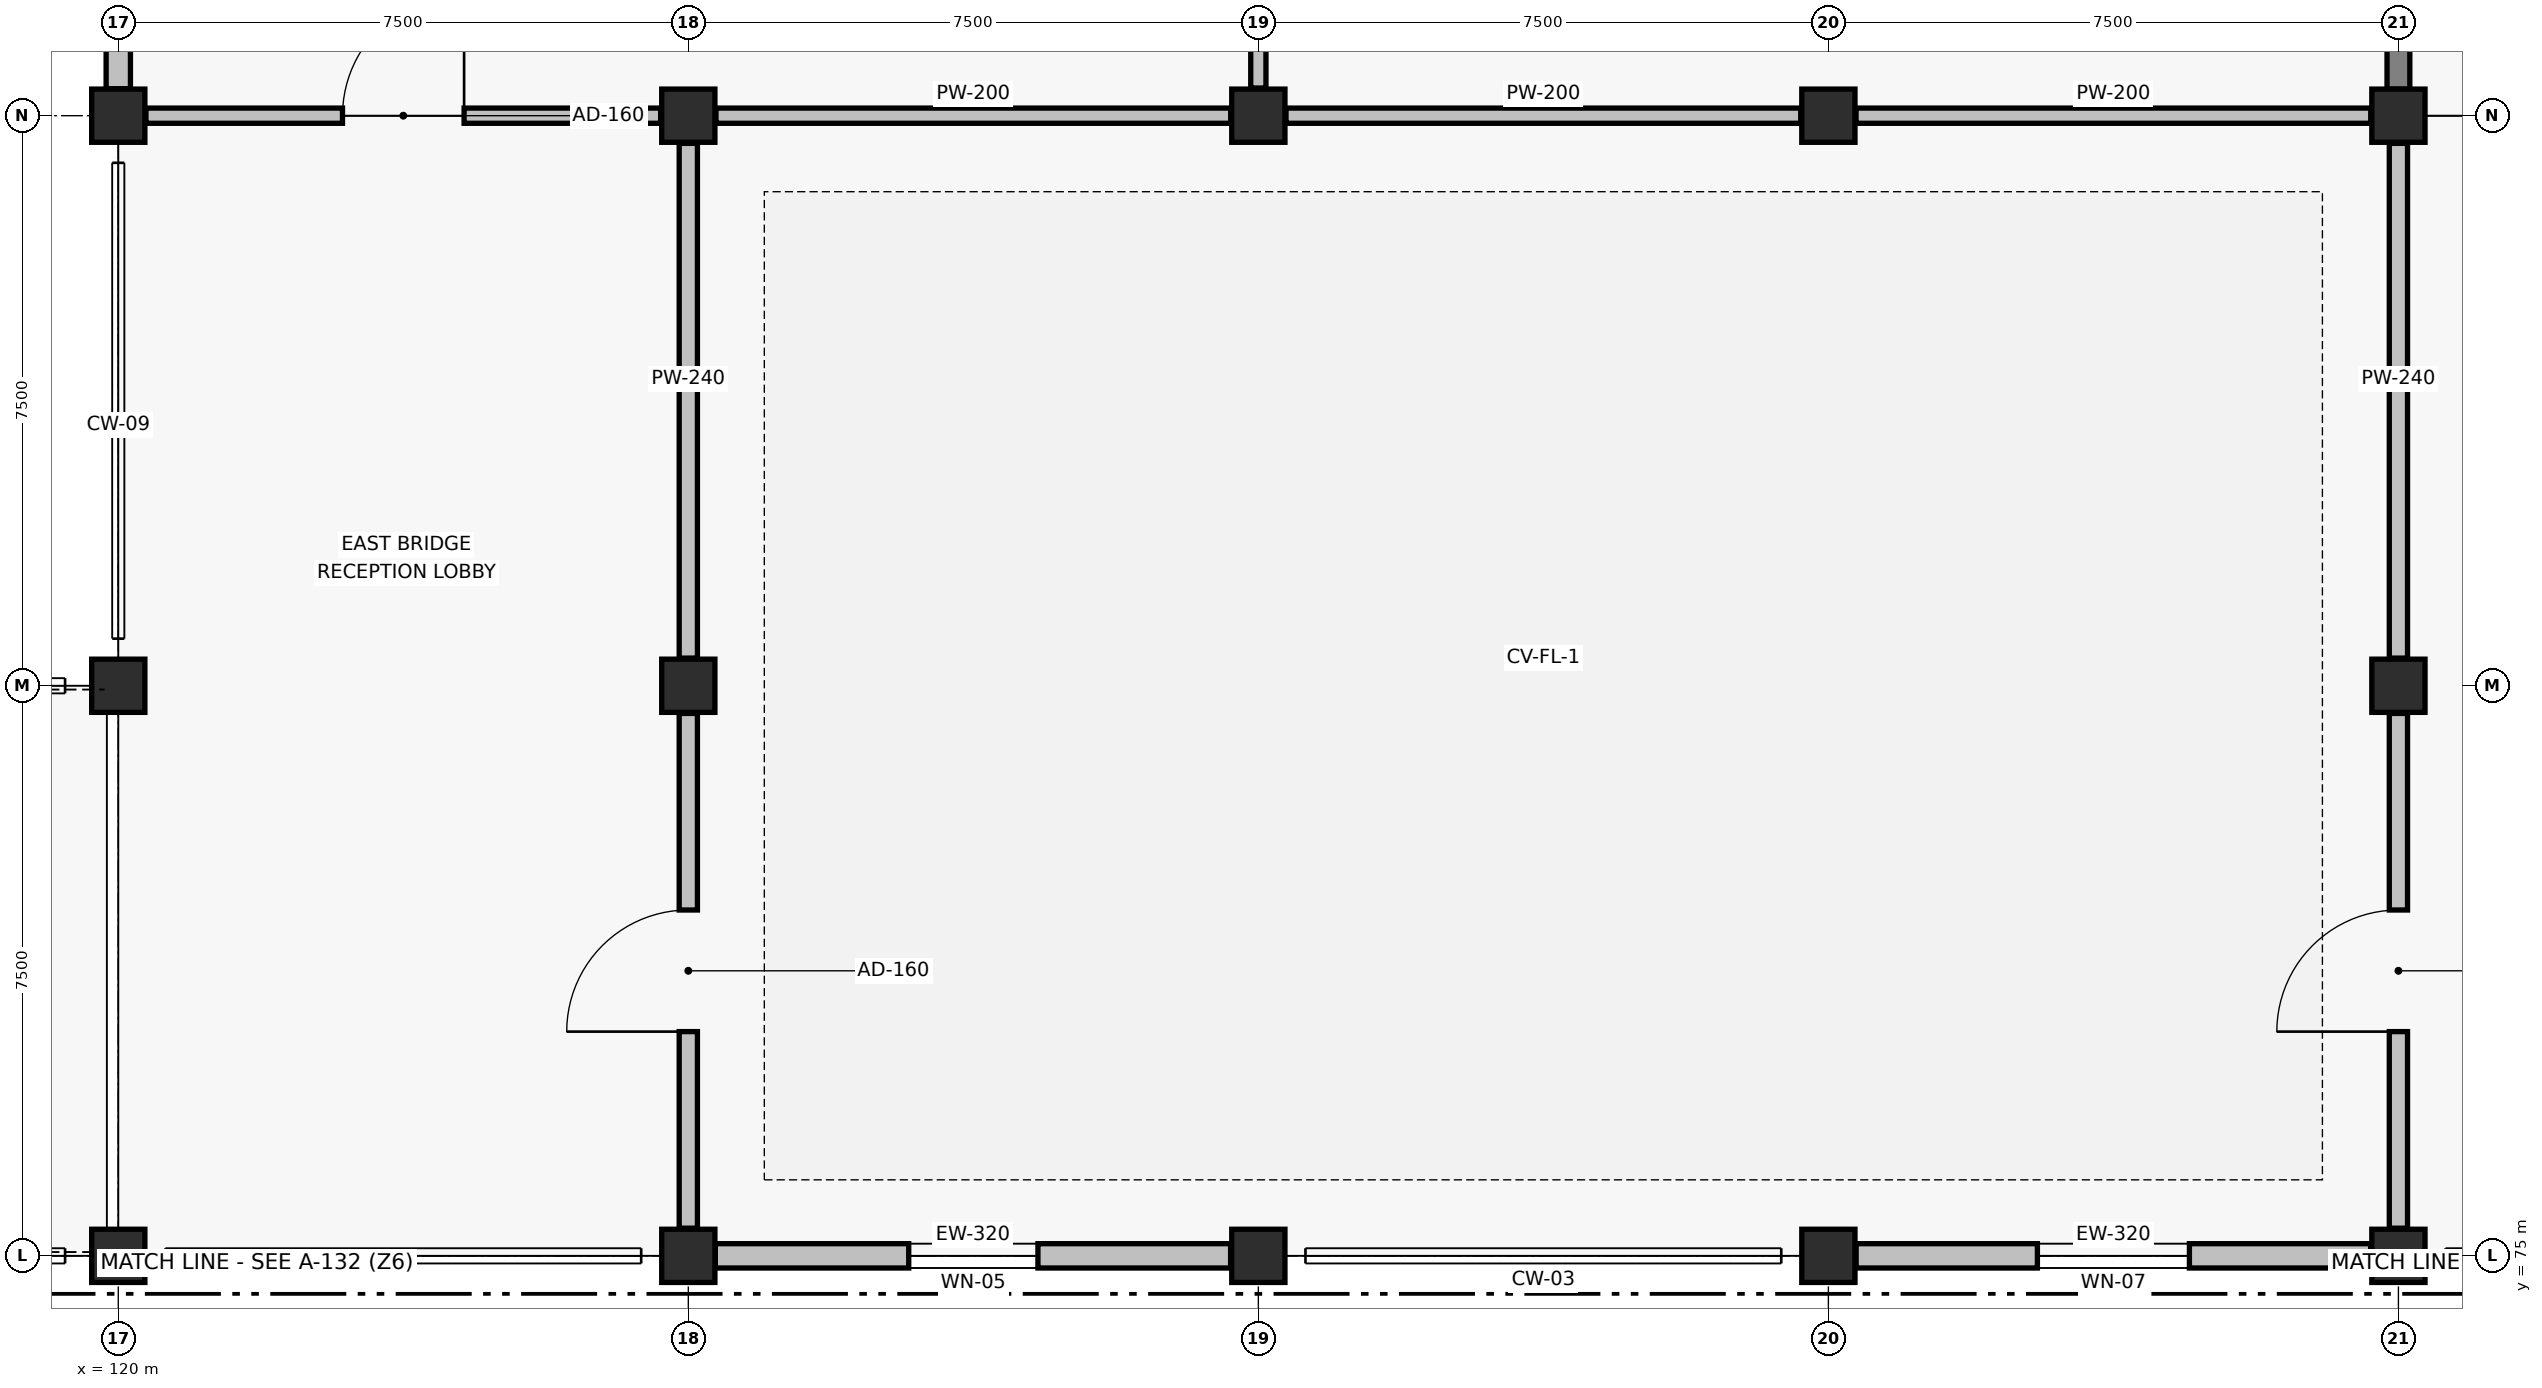
"""IFC4 building model, lengths in metres.
Left out: names, types, materials, properties, quantities, classifications, styles, units other than length and angle.
Written with IfcOpenShell. Run it as: python <this file> out.ifc"""

import sys

from ifc_helpers import new_model, si_unit, direction, frame, frame_2d, origin, origin_2d, place, context, subcontext, project, spatial, rectangle, extrude, element, fill, save


model = new_model("IFC4")
c1 = context("Model", 3, precision=1e-05, world=origin(), true_north=direction((0.0, 1.0)))
c2 = subcontext(c1, "Body", "Model", "MODEL_VIEW")
j1 = project(units=[si_unit("LENGTHUNIT", "METRE"), si_unit("PLANEANGLEUNIT", "RADIAN")], contexts=[c1])
p1 = place(None, origin())
s1 = spatial("IfcSite", under=j1, at=p1, CompositionType="ELEMENT")
p2 = place(p1, origin())
s2 = spatial("IfcBuilding", under=s1, at=p2, CompositionType="ELEMENT")
p3 = place(p2, frame((0.0, 0.0, 4.8)))
s3 = spatial("IfcBuildingStorey", under=s2, at=p3, CompositionType="ELEMENT", Elevation=4.8)
for number, where, z_axis, x_axis in (
    (1, (120.0, 75.0, 0.0), (0.0, 0.0, 1.0), (1.0, 0.0, 0.0)),
    (2, (120.0, 82.5, 0.0), (0.0, 0.0, 1.0), (1.0, 0.0, 0.0)),
    (3, (120.0, 90.0, 0.0), (0.0, 0.0, 1.0), (1.0, 0.0, 0.0)),
    (4, (127.5, 75.0, 0.0), (0.0, 0.0, 1.0), (1.0, 0.0, 0.0)),
    (5, (127.5, 82.5, 0.0), (0.0, 0.0, 1.0), (1.0, 0.0, 0.0)),
    (6, (127.5, 90.0, 0.0), (0.0, 0.0, 1.0), (1.0, 0.0, 0.0)),
    (7, (135.0, 75.0, 0.0), (0.0, 0.0, 1.0), (1.0, 0.0, 0.0)),
    (8, (135.0, 90.0, 0.0), (0.0, 0.0, 1.0), (1.0, 0.0, 0.0)),
    (9, (142.5, 75.0, 0.0), (0.0, 0.0, 1.0), (1.0, 0.0, 0.0)),
    (10, (142.5, 90.0, 0.0), (0.0, 0.0, 1.0), (1.0, 0.0, 0.0)),
    (11, (150.0, 75.0, 0.0), (0.0, 0.0, 1.0), (1.0, 0.0, 0.0)),
    (12, (150.0, 82.5, 0.0), (0.0, 0.0, 1.0), (1.0, 0.0, 0.0)),
    (13, (150.0, 90.0, 0.0), (0.0, 0.0, 1.0), (1.0, 0.0, 0.0)),
):
    element("IfcColumn", number, at=place(p3, frame(where, z_axis=z_axis, x_axis=x_axis)), inside=s3, PredefinedType="COLUMN", context=c2, shape_type="SweptSolid", body=[
        extrude(rectangle(XDim=0.7, YDim=0.7, at=origin_2d()), origin(), (0.0, 0.0, 1.0), 4.2),
    ])
p4 = place(p3, frame((150.0, 90.35, 0.0), z_axis=(0.0, 0.0, 1.0), x_axis=(0.0, 1.0, 0.0)))
e14 = element("IfcWall", 14, at=p4, inside=s3, PredefinedType="SHEAR", context=c2, shape_type="SweptSolid", body=[
    extrude(rectangle(XDim=6.8, YDim=0.3, at=frame_2d((3.4, 0.0))), origin(), (0.0, 0.0, 1.0), 3.9),
])
p5 = place(p3, frame((127.855, 75.0, 0.0), z_axis=(0.0, 0.0, 1.0), x_axis=(1.0, 0.0, 0.0)))
e15 = element("IfcWall", 15, at=p5, inside=s3, PredefinedType="SOLIDWALL", context=c2, shape_type="SweptSolid", body=[
    extrude(rectangle(XDim=6.78, YDim=0.32, at=frame_2d((3.39, 0.0))), origin(), (0.0, 0.0, 1.0), 2.89),
])
p6 = place(p5, frame((2.545, 0.0, 0.6)))
e16 = element("IfcOpeningElement", 16, at=p6, cuts=e15, PredefinedType="OPENING", context=c2, shape_type="SweptSolid", body=[
    extrude(rectangle(XDim=1.7, YDim=1.8, at=frame_2d((0.85, 0.9))), frame((0.0, 0.17, 0.0), z_axis=(0.0, -1.0, 0.0), x_axis=(1.0, 0.0, 0.0)), (0.0, 0.0, 1.0), 0.34),
])
p7 = place(p3, frame((142.865, 75.0, 0.0), z_axis=(0.0, 0.0, 1.0), x_axis=(1.0, 0.0, 0.0)))
e17 = element("IfcWall", 17, at=p7, inside=s3, PredefinedType="SOLIDWALL", context=c2, shape_type="SweptSolid", body=[
    extrude(rectangle(XDim=6.77, YDim=0.32, at=frame_2d((3.385, 0.0))), origin(), (0.0, 0.0, 1.0), 2.89),
])
p8 = place(p7, frame((2.385, 0.0, 0.6)))
e18 = element("IfcOpeningElement", 18, at=p8, cuts=e17, PredefinedType="OPENING", context=c2, shape_type="SweptSolid", body=[
    extrude(rectangle(XDim=2.0, YDim=1.45, at=frame_2d((1.0, 0.725))), frame((0.0, 0.17, 0.0), z_axis=(0.0, -1.0, 0.0), x_axis=(1.0, 0.0, 0.0)), (0.0, 0.0, 1.0), 0.34),
])
p9 = place(p3, frame((120.0, 90.355, 0.0), z_axis=(0.0, 0.0, 1.0), x_axis=(0.0, 1.0, 0.0)))
e19 = element("IfcWall", 19, at=p9, inside=s3, PredefinedType="SOLIDWALL", context=c2, shape_type="SweptSolid", body=[
    extrude(rectangle(XDim=6.79, YDim=0.32, at=frame_2d((3.395, 0.0))), origin(), (0.0, 0.0, 1.0), 2.99),
])
p10 = place(p9, frame((2.62, 0.0, 0.6)))
e20 = element("IfcOpeningElement", 20, at=p10, cuts=e19, PredefinedType="OPENING", context=c2, shape_type="SweptSolid", body=[
    extrude(rectangle(XDim=1.55, YDim=1.8, at=frame_2d((0.775, 0.9))), frame((0.0, 0.17, 0.0), z_axis=(0.0, -1.0, 0.0), x_axis=(1.0, 0.0, 0.0)), (0.0, 0.0, 1.0), 0.34),
])
p11 = place(p3, frame((120.364, 90.0, 0.0), z_axis=(0.0, 0.0, 1.0), x_axis=(1.0, 0.0, 0.0)))
e21 = element("IfcWall", 21, at=p11, inside=s3, PredefinedType="PARTITIONING", context=c2, shape_type="SweptSolid", body=[
    extrude(rectangle(XDim=6.772, YDim=0.2, at=frame_2d((3.386, 0.0))), origin(), (0.0, 0.0, 1.0), 2.94),
])
p12 = place(p11, frame((2.586, 0.0, 0.0)))
e22 = element("IfcOpeningElement", 22, at=p12, cuts=e21, PredefinedType="OPENING", context=c2, shape_type="SweptSolid", body=[
    extrude(rectangle(XDim=1.6, YDim=2.16, at=frame_2d((0.8, 1.08))), frame((0.0, 0.11, 0.0), z_axis=(0.0, -1.0, 0.0), x_axis=(1.0, 0.0, 0.0)), (0.0, 0.0, 1.0), 0.22),
])
for number, where, z_axis, x_axis in (
    (23, (127.864, 90.0, 0.0), (0.0, 0.0, 1.0), (1.0, 0.0, 0.0)),
    (24, (135.364, 90.0, 0.0), (0.0, 0.0, 1.0), (1.0, 0.0, 0.0)),
):
    element("IfcWall", number, at=place(p3, frame(where, z_axis=z_axis, x_axis=x_axis)), inside=s3, PredefinedType="PARTITIONING", context=c2, shape_type="SweptSolid", body=[
        extrude(rectangle(XDim=6.772, YDim=0.2, at=frame_2d((3.386, 0.0))), origin(), (0.0, 0.0, 1.0), 2.89),
    ])
p13 = place(p3, frame((142.864, 90.0, 0.0), z_axis=(0.0, 0.0, 1.0), x_axis=(1.0, 0.0, 0.0)))
e25 = element("IfcWall", 25, at=p13, inside=s3, PredefinedType="PARTITIONING", context=c2, shape_type="SweptSolid", body=[
    extrude(rectangle(XDim=6.772, YDim=0.2, at=frame_2d((3.386, 0.0))), origin(), (0.0, 0.0, 1.0), 2.84),
])
p14 = place(p3, frame((127.5, 75.364, 0.0), z_axis=(0.0, 0.0, 1.0), x_axis=(0.0, 1.0, 0.0)))
e26 = element("IfcWall", 26, at=p14, inside=s3, PredefinedType="PARTITIONING", context=c2, shape_type="SweptSolid", body=[
    extrude(rectangle(XDim=6.772, YDim=0.24, at=frame_2d((3.386, 0.0))), origin(), (0.0, 0.0, 1.0), 3.04),
])
p15 = place(p14, frame((2.586, 0.0, 0.0)))
e27 = element("IfcOpeningElement", 27, at=p15, cuts=e26, PredefinedType="OPENING", context=c2, shape_type="SweptSolid", body=[
    extrude(rectangle(XDim=1.6, YDim=2.16, at=frame_2d((0.8, 1.08))), frame((0.0, 0.13, 0.0), z_axis=(0.0, -1.0, 0.0), x_axis=(1.0, 0.0, 0.0)), (0.0, 0.0, 1.0), 0.26),
])
p16 = place(p3, frame((127.5, 82.864, 0.0), z_axis=(0.0, 0.0, 1.0), x_axis=(0.0, 1.0, 0.0)))
e28 = element("IfcWall", 28, at=p16, inside=s3, PredefinedType="PARTITIONING", context=c2, shape_type="SweptSolid", body=[
    extrude(rectangle(XDim=6.772, YDim=0.24, at=frame_2d((3.386, 0.0))), origin(), (0.0, 0.0, 1.0), 2.94),
])
p17 = place(p3, frame((135.0, 90.364, 0.0), z_axis=(0.0, 0.0, 1.0), x_axis=(0.0, 1.0, 0.0)))
e29 = element("IfcWall", 29, at=p17, inside=s3, PredefinedType="PARTITIONING", context=c2, shape_type="SweptSolid", body=[
    extrude(rectangle(XDim=6.772, YDim=0.2, at=frame_2d((3.386, 0.0))), origin(), (0.0, 0.0, 1.0), 2.84),
])
p18 = place(p3, frame((150.0, 75.364, 0.0), z_axis=(0.0, 0.0, 1.0), x_axis=(0.0, 1.0, 0.0)))
e30 = element("IfcWall", 30, at=p18, inside=s3, PredefinedType="PARTITIONING", context=c2, shape_type="SweptSolid", body=[
    extrude(rectangle(XDim=6.772, YDim=0.24, at=frame_2d((3.386, 0.0))), origin(), (0.0, 0.0, 1.0), 2.94),
])
p19 = place(p18, frame((2.586, 0.0, 0.0)))
e31 = element("IfcOpeningElement", 31, at=p19, cuts=e30, PredefinedType="OPENING", context=c2, shape_type="SweptSolid", body=[
    extrude(rectangle(XDim=1.6, YDim=2.16, at=frame_2d((0.8, 1.08))), frame((0.0, 0.13, 0.0), z_axis=(0.0, -1.0, 0.0), x_axis=(1.0, 0.0, 0.0)), (0.0, 0.0, 1.0), 0.26),
])
p20 = place(p3, frame((150.0, 82.864, 0.0), z_axis=(0.0, 0.0, 1.0), x_axis=(0.0, 1.0, 0.0)))
e32 = element("IfcWall", 32, at=p20, inside=s3, PredefinedType="PARTITIONING", context=c2, shape_type="SweptSolid", body=[
    extrude(rectangle(XDim=6.772, YDim=0.24, at=frame_2d((3.386, 0.0))), origin(), (0.0, 0.0, 1.0), 2.84),
])
p21 = place(p6, origin())
e33 = element("IfcWindow", 33, at=p21, inside=s3, PartitioningType="SINGLE_PANEL", PredefinedType="WINDOW", context=c2, shape_type="SweptSolid", body=[
    extrude(rectangle(XDim=1.7, YDim=1.8, at=frame_2d((0.85, 0.9))), frame((0.0, 0.03, 0.0), z_axis=(0.0, -1.0, 0.0), x_axis=(1.0, 0.0, 0.0)), (0.0, 0.0, 1.0), 0.06),
])
fill(e16, e33)
p22 = place(p8, origin())
e34 = element("IfcWindow", 34, at=p22, inside=s3, PartitioningType="SINGLE_PANEL", PredefinedType="WINDOW", context=c2, shape_type="SweptSolid", body=[
    extrude(rectangle(XDim=2.0, YDim=1.45, at=frame_2d((1.0, 0.725))), frame((0.0, 0.03, 0.0), z_axis=(0.0, -1.0, 0.0), x_axis=(1.0, 0.0, 0.0)), (0.0, 0.0, 1.0), 0.06),
])
fill(e18, e34)
p23 = place(p12, origin())
e35 = element("IfcDoor", 35, at=p23, inside=s3, OperationType="SINGLE_SWING_RIGHT", PredefinedType="DOOR", context=c2, shape_type="SweptSolid", body=[
    extrude(rectangle(XDim=1.6, YDim=2.16, at=frame_2d((0.8, 1.08))), frame((0.0, 0.025, 0.0), z_axis=(0.0, -1.0, 0.0), x_axis=(1.0, 0.0, 0.0)), (0.0, 0.0, 1.0), 0.05),
])
fill(e22, e35)
p24 = place(p15, origin())
e36 = element("IfcDoor", 36, at=p24, inside=s3, OperationType="SINGLE_SWING_LEFT", PredefinedType="DOOR", context=c2, shape_type="SweptSolid", body=[
    extrude(rectangle(XDim=1.6, YDim=2.16, at=frame_2d((0.8, 1.08))), frame((0.0, 0.025, 0.0), z_axis=(0.0, -1.0, 0.0), x_axis=(1.0, 0.0, 0.0)), (0.0, 0.0, 1.0), 0.05),
])
fill(e27, e36)
p25 = place(p19, origin())
e37 = element("IfcDoor", 37, at=p25, inside=s3, OperationType="SINGLE_SWING_LEFT", PredefinedType="DOOR", context=c2, shape_type="SweptSolid", body=[
    extrude(rectangle(XDim=1.6, YDim=2.16, at=frame_2d((0.8, 1.08))), frame((0.0, 0.025, 0.0), z_axis=(0.0, -1.0, 0.0), x_axis=(1.0, 0.0, 0.0)), (0.0, 0.0, 1.0), 0.05),
])
fill(e31, e37)
save(model, sys.argv[1])
